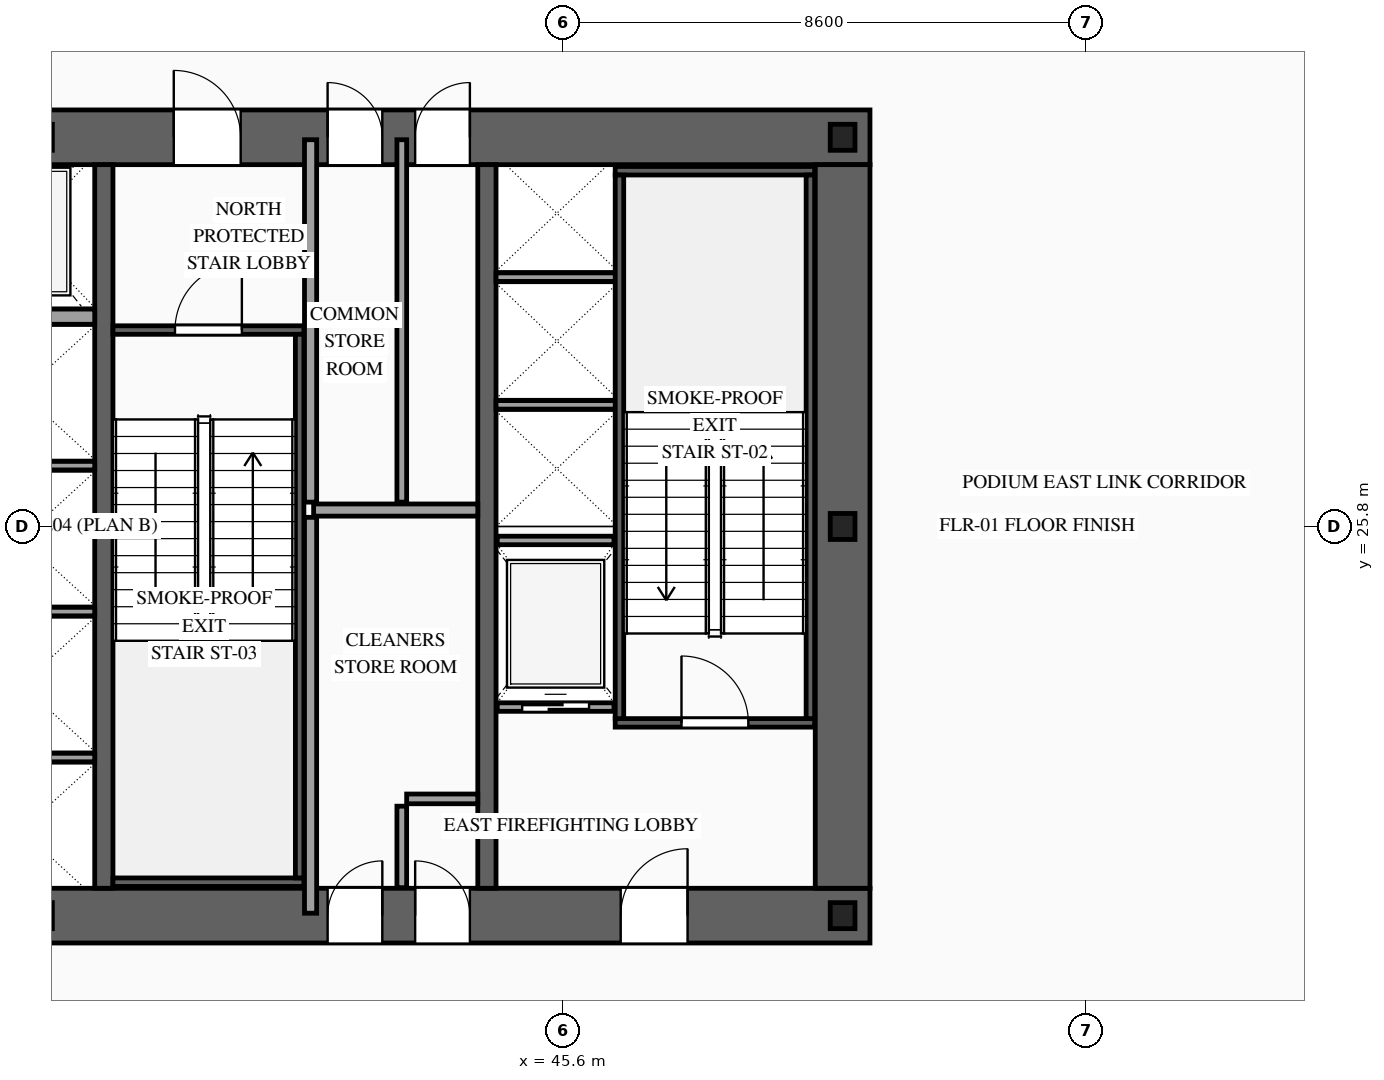
"""IFC4 building model, lengths in metres.
Left out: names, types, materials, properties, quantities, classifications, styles, units other than length and angle.
Written with IfcOpenShell. Run it as: python <this file> out.ifc"""

import sys

from ifc_helpers import new_model, si_unit, direction, frame, frame_2d, origin, origin_2d, place, context, subcontext, project, spatial, rectangle, i_section, extrude, source, transform, mapped, element, fill, save


model = new_model("IFC4")
c1 = context("Model", 3, precision=1e-05, world=origin(), true_north=direction((0.0, 1.0)))
c2 = subcontext(c1, "Body", "Model", "MODEL_VIEW")
j1 = project(units=[si_unit("LENGTHUNIT", "METRE"), si_unit("PLANEANGLEUNIT", "RADIAN")], contexts=[c1])
p1 = place(None, origin())
s1 = spatial("IfcSite", under=j1, at=p1, CompositionType="ELEMENT")
p2 = place(p1, origin())
s2 = spatial("IfcBuilding", under=s1, at=p2, CompositionType="ELEMENT")
p3 = place(p2, frame((0.0, 0.0, 25.8)))
s3 = spatial("IfcBuildingStorey", under=s2, at=p3, CompositionType="ELEMENT", Elevation=25.8)
p4 = place(p3, frame((23.35, 19.4, 0.0), z_axis=(0.0, 0.0, 1.0), x_axis=(1.0, 0.0, 0.0)))
e1 = element("IfcWall", 1, at=p4, inside=s3, PredefinedType="SHEAR", context=c2, shape_type="SweptSolid", body=[
    extrude(rectangle(XDim=27.3, YDim=0.9, at=frame_2d((13.65, 0.0))), origin(), (0.0, 0.0, 1.0), 4.8),
])
p5 = place(p4, frame((2.1, 0.0, 0.0)))
e2 = element("IfcOpeningElement", 2, at=p5, cuts=e1, PredefinedType="OPENING", context=c2, shape_type="SweptSolid", body=[
    extrude(rectangle(XDim=1.1, YDim=2.2, at=frame_2d((0.55, 1.1))), frame((0.0, 0.465, 0.0), z_axis=(0.0, -1.0, 0.0), x_axis=(1.0, 0.0, 0.0)), (0.0, 0.0, 1.0), 0.93),
])
p6 = place(p4, frame((10.0, 0.0, 0.0)))
e3 = element("IfcOpeningElement", 3, at=p6, cuts=e1, PredefinedType="OPENING", context=c2, shape_type="SweptSolid", body=[
    extrude(rectangle(XDim=1.1, YDim=2.2, at=frame_2d((0.55, 1.1))), frame((0.0, 0.465, 0.0), z_axis=(0.0, -1.0, 0.0), x_axis=(1.0, 0.0, 0.0)), (0.0, 0.0, 1.0), 0.93),
])
p7 = place(p4, frame((23.2, 0.0, 0.0)))
e4 = element("IfcOpeningElement", 4, at=p7, cuts=e1, PredefinedType="OPENING", context=c2, shape_type="SweptSolid", body=[
    extrude(rectangle(XDim=1.1, YDim=2.2, at=frame_2d((0.55, 1.1))), frame((0.0, 0.465, 0.0), z_axis=(0.0, -1.0, 0.0), x_axis=(1.0, 0.0, 0.0)), (0.0, 0.0, 1.0), 0.93),
])
p8 = place(p4, frame((19.82, 0.0, 0.0)))
e5 = element("IfcOpeningElement", 5, at=p8, cuts=e1, PredefinedType="OPENING", context=c2, shape_type="SweptSolid", body=[
    extrude(rectangle(XDim=0.9, YDim=2.15, at=frame_2d((0.45, 1.075))), frame((0.0, 0.465, 0.0), z_axis=(0.0, -1.0, 0.0), x_axis=(1.0, 0.0, 0.0)), (0.0, 0.0, 1.0), 0.93),
])
p9 = place(p4, frame((18.38, 0.0, 0.0)))
e6 = element("IfcOpeningElement", 6, at=p9, cuts=e1, PredefinedType="OPENING", context=c2, shape_type="SweptSolid", body=[
    extrude(rectangle(XDim=0.9, YDim=2.15, at=frame_2d((0.45, 1.075))), frame((0.0, 0.465, 0.0), z_axis=(0.0, -1.0, 0.0), x_axis=(1.0, 0.0, 0.0)), (0.0, 0.0, 1.0), 0.93),
])
p10 = place(p3, frame((23.35, 32.2, 0.0), z_axis=(0.0, 0.0, 1.0), x_axis=(1.0, 0.0, 0.0)))
e7 = element("IfcWall", 7, at=p10, inside=s3, PredefinedType="SHEAR", context=c2, shape_type="SweptSolid", body=[
    extrude(rectangle(XDim=27.3, YDim=0.9, at=frame_2d((13.65, 0.0))), origin(), (0.0, 0.0, 1.0), 4.8),
])
p11 = place(p10, frame((4.72, 0.0, 0.0)))
e8 = element("IfcOpeningElement", 8, at=p11, cuts=e7, PredefinedType="OPENING", context=c2, shape_type="SweptSolid", body=[
    extrude(rectangle(XDim=0.9, YDim=2.15, at=frame_2d((0.45, 1.075))), frame((0.0, 0.465, 0.0), z_axis=(0.0, -1.0, 0.0), x_axis=(1.0, 0.0, 0.0)), (0.0, 0.0, 1.0), 0.93),
])
p12 = place(p10, frame((10.0, 0.0, 0.0)))
e9 = element("IfcOpeningElement", 9, at=p12, cuts=e7, PredefinedType="OPENING", context=c2, shape_type="SweptSolid", body=[
    extrude(rectangle(XDim=1.1, YDim=2.2, at=frame_2d((0.55, 1.1))), frame((0.0, 0.465, 0.0), z_axis=(0.0, -1.0, 0.0), x_axis=(1.0, 0.0, 0.0)), (0.0, 0.0, 1.0), 0.93),
])
p13 = place(p10, frame((15.85, 0.0, 0.0)))
e10 = element("IfcOpeningElement", 10, at=p13, cuts=e7, PredefinedType="OPENING", context=c2, shape_type="SweptSolid", body=[
    extrude(rectangle(XDim=1.1, YDim=2.2, at=frame_2d((0.55, 1.1))), frame((0.0, 0.465, 0.0), z_axis=(0.0, -1.0, 0.0), x_axis=(1.0, 0.0, 0.0)), (0.0, 0.0, 1.0), 0.93),
])
p14 = place(p10, frame((18.38, 0.0, 0.0)))
e11 = element("IfcOpeningElement", 11, at=p14, cuts=e7, PredefinedType="OPENING", context=c2, shape_type="SweptSolid", body=[
    extrude(rectangle(XDim=0.9, YDim=2.15, at=frame_2d((0.45, 1.075))), frame((0.0, 0.465, 0.0), z_axis=(0.0, -1.0, 0.0), x_axis=(1.0, 0.0, 0.0)), (0.0, 0.0, 1.0), 0.93),
])
p15 = place(p10, frame((19.82, 0.0, 0.0)))
e12 = element("IfcOpeningElement", 12, at=p15, cuts=e7, PredefinedType="OPENING", context=c2, shape_type="SweptSolid", body=[
    extrude(rectangle(XDim=0.9, YDim=2.15, at=frame_2d((0.45, 1.075))), frame((0.0, 0.465, 0.0), z_axis=(0.0, -1.0, 0.0), x_axis=(1.0, 0.0, 0.0)), (0.0, 0.0, 1.0), 0.93),
])
m1 = source(origin(), c2, "Body", "SweptSolid", [
    extrude(rectangle(XDim=11.9, YDim=0.9, at=frame_2d((5.95, 0.0))), origin(), (0.0, 0.0, 1.0), 4.8),
])
p16 = place(p3, frame((50.2, 19.85, 0.0), z_axis=(0.0, 0.0, 1.0), x_axis=(0.0, 1.0, 0.0)))
e13 = element("IfcWall", 13, at=p16, inside=s3, PredefinedType="SHEAR", context=c2, shape_type="MappedRepresentation", body=[
    mapped(m1, transform((0.0, 0.0, 0.0), scale=1.0)),
])
m2 = source(origin(), c2, "Body", "SweptSolid", [
    extrude(rectangle(XDim=11.9, YDim=0.3, at=frame_2d((5.95, 0.0))), origin(), (0.0, 0.0, 1.0), 4.8),
])
for number, where, z_axis, x_axis in (
    (14, (38.05, 19.85, 0.0), (0.0, 0.0, 1.0), (0.0, 1.0, 0.0)),
    (15, (44.35, 19.85, 0.0), (0.0, 0.0, 1.0), (0.0, 1.0, 0.0)),
):
    element("IfcWall", number, at=place(p3, frame(where, z_axis=z_axis, x_axis=x_axis)), inside=s3, PredefinedType="SOLIDWALL", context=c2, shape_type="MappedRepresentation", body=[
        mapped(m2, transform((0.0, 0.0, 0.0), scale=1.0)),
    ])
m3 = source(origin(), c2, "Body", "SweptSolid", [
    extrude(i_section(OverallWidth=0.407, OverallDepth=0.428, WebThickness=0.02, FlangeThickness=0.035, at=origin_2d()), origin(), (0.0, 0.0, 1.0), 4.8),
])
for number, where, z_axis, x_axis in (
    (16, (37.0, 19.4, 0.0), (0.0, 0.0, 1.0), (1.0, 0.0, 0.0)),
    (17, (50.2, 19.4, 0.0), (0.0, 0.0, 1.0), (1.0, 0.0, 0.0)),
    (18, (50.2, 25.8, 0.0), (0.0, 0.0, 1.0), (1.0, 0.0, 0.0)),
    (19, (37.0, 32.2, 0.0), (0.0, 0.0, 1.0), (1.0, 0.0, 0.0)),
    (20, (50.2, 32.2, 0.0), (0.0, 0.0, 1.0), (1.0, 0.0, 0.0)),
):
    element("IfcColumn", number, at=place(p3, frame(where, z_axis=z_axis, x_axis=x_axis)), inside=s3, PredefinedType="COLUMN", context=c2, shape_type="MappedRepresentation", body=[
        mapped(m3, transform((0.0, 0.0, 0.0), scale=1.0)),
    ])
p17 = place(p3, frame((44.52, 22.83, 0.0), z_axis=(0.0, 0.0, 1.0), x_axis=(1.0, 0.0, 0.0)))
e21 = element("IfcWall", 21, at=p17, inside=s3, PredefinedType="SOLIDWALL", context=c2, shape_type="SweptSolid", body=[
    extrude(rectangle(XDim=1.92, YDim=0.14, at=frame_2d((0.96, 0.0))), origin(), (0.0, 0.0, 1.0), 4.5),
])
p18 = place(p17, frame((0.41, 0.0, 0.0)))
e22 = element("IfcOpeningElement", 22, at=p18, cuts=e21, PredefinedType="OPENING", context=c2, shape_type="SweptSolid", body=[
    extrude(rectangle(XDim=1.1, YDim=2.2, at=frame_2d((0.55, 1.1))), frame((0.0, 0.085, 0.0), z_axis=(0.0, -1.0, 0.0), x_axis=(1.0, 0.0, 0.0)), (0.0, 0.0, 1.0), 0.17),
])
m4 = source(origin(), c2, "Body", "SweptSolid", [
    extrude(rectangle(XDim=1.92, YDim=0.14, at=frame_2d((0.96, 0.0))), origin(), (0.0, 0.0, 1.0), 4.5),
])
p19 = place(p3, frame((44.52, 25.57, 0.0), z_axis=(0.0, 0.0, 1.0), x_axis=(1.0, 0.0, 0.0)))
e23 = element("IfcWall", 23, at=p19, inside=s3, PredefinedType="SOLIDWALL", context=c2, shape_type="MappedRepresentation", body=[
    mapped(m4, transform((0.0, 0.0, 0.0), scale=1.0)),
])
m5 = source(origin(), c2, "Body", "SweptSolid", [
    extrude(rectangle(XDim=2.4, YDim=0.14, at=frame_2d((1.2, 0.0))), origin(), (0.0, 0.0, 1.0), 4.5),
])
for number, where, z_axis, x_axis in (
    (24, (35.5, 22.0, 0.0), (0.0, 0.0, 1.0), (1.0, 0.0, 0.0)),
    (25, (35.5, 24.4, 0.0), (0.0, 0.0, 1.0), (1.0, 0.0, 0.0)),
    (26, (35.5, 26.8, 0.0), (0.0, 0.0, 1.0), (1.0, 0.0, 0.0)),
):
    element("IfcWall", number, at=place(p3, frame(where, z_axis=z_axis, x_axis=x_axis)), inside=s3, PredefinedType="SOLIDWALL", context=c2, shape_type="MappedRepresentation", body=[
        mapped(m5, transform((0.0, 0.0, 0.0), scale=1.0)),
    ])
m6 = source(origin(), c2, "Body", "SweptSolid", [
    extrude(rectangle(XDim=2.4, YDim=0.25, at=frame_2d((1.2, 0.0))), origin(), (0.0, 0.0, 1.0), 4.5),
])
p20 = place(p3, frame((35.5, 29.25, 0.0), z_axis=(0.0, 0.0, 1.0), x_axis=(1.0, 0.0, 0.0)))
e27 = element("IfcWall", 27, at=p20, inside=s3, PredefinedType="SOLIDWALL", context=c2, shape_type="MappedRepresentation", body=[
    mapped(m6, transform((0.0, 0.0, 0.0), scale=1.0)),
])
m7 = source(origin(), c2, "Body", "SweptSolid", [
    extrude(rectangle(XDim=2.0, YDim=0.14, at=frame_2d((1.0, 0.0))), origin(), (0.0, 0.0, 1.0), 4.5),
])
for number, where, z_axis, x_axis in (
    (28, (44.5, 27.8, 0.0), (0.0, 0.0, 1.0), (1.0, 0.0, 0.0)),
    (29, (44.5, 29.9, 0.0), (0.0, 0.0, 1.0), (1.0, 0.0, 0.0)),
):
    element("IfcWall", number, at=place(p3, frame(where, z_axis=z_axis, x_axis=x_axis)), inside=s3, PredefinedType="SOLIDWALL", context=c2, shape_type="MappedRepresentation", body=[
        mapped(m7, transform((0.0, 0.0, 0.0), scale=1.0)),
    ])
p21 = place(p3, frame((46.46, 22.57, 0.0), z_axis=(0.0, 0.0, 1.0), x_axis=(1.0, 0.0, 0.0)))
e30 = element("IfcWall", 30, at=p21, inside=s3, PredefinedType="SOLIDWALL", context=c2, shape_type="SweptSolid", body=[
    extrude(rectangle(XDim=3.28, YDim=0.14, at=frame_2d((1.64, 0.0))), origin(), (0.0, 0.0, 1.0), 4.5),
])
p22 = place(p21, frame((1.09, 0.0, 0.0)))
e31 = element("IfcOpeningElement", 31, at=p22, cuts=e30, PredefinedType="OPENING", context=c2, shape_type="SweptSolid", body=[
    extrude(rectangle(XDim=1.1, YDim=2.2, at=frame_2d((0.55, 1.1))), frame((0.0, 0.085, 0.0), z_axis=(0.0, -1.0, 0.0), x_axis=(1.0, 0.0, 0.0)), (0.0, 0.0, 1.0), 0.17),
])
m8 = source(origin(), c2, "Body", "SweptSolid", [
    extrude(rectangle(XDim=3.28, YDim=0.14, at=frame_2d((1.64, 0.0))), origin(), (0.0, 0.0, 1.0), 4.5),
])
p23 = place(p3, frame((46.46, 31.65, 0.0), z_axis=(0.0, 0.0, 1.0), x_axis=(1.0, 0.0, 0.0)))
e32 = element("IfcWall", 32, at=p23, inside=s3, PredefinedType="SOLIDWALL", context=c2, shape_type="MappedRepresentation", body=[
    mapped(m8, transform((0.0, 0.0, 0.0), scale=1.0)),
])
m9 = source(origin(), c2, "Body", "SweptSolid", [
    extrude(rectangle(XDim=8.94, YDim=0.14, at=frame_2d((4.47, 0.0))), origin(), (0.0, 0.0, 1.0), 4.5),
])
for number, where, z_axis, x_axis in (
    (33, (46.53, 22.64, 0.0), (0.0, 0.0, 1.0), (0.0, 1.0, 0.0)),
    (34, (49.67, 22.64, 0.0), (0.0, 0.0, 1.0), (0.0, 1.0, 0.0)),
):
    element("IfcWall", number, at=place(p3, frame(where, z_axis=z_axis, x_axis=x_axis)), inside=s3, PredefinedType="SOLIDWALL", context=c2, shape_type="MappedRepresentation", body=[
        mapped(m9, transform((0.0, 0.0, 0.0), scale=1.0)),
    ])
p24 = place(p3, frame((38.2, 29.03, 0.0), z_axis=(0.0, 0.0, 1.0), x_axis=(1.0, 0.0, 0.0)))
e35 = element("IfcWall", 35, at=p24, inside=s3, PredefinedType="SOLIDWALL", context=c2, shape_type="SweptSolid", body=[
    extrude(rectangle(XDim=3.14, YDim=0.14, at=frame_2d((1.57, 0.0))), origin(), (0.0, 0.0, 1.0), 4.5),
])
p25 = place(p24, frame((1.02, 0.0, 0.0)))
e36 = element("IfcOpeningElement", 36, at=p25, cuts=e35, PredefinedType="OPENING", context=c2, shape_type="SweptSolid", body=[
    extrude(rectangle(XDim=1.1, YDim=2.2, at=frame_2d((0.55, 1.1))), frame((0.0, 0.085, 0.0), z_axis=(0.0, -1.0, 0.0), x_axis=(1.0, 0.0, 0.0)), (0.0, 0.0, 1.0), 0.17),
])
m10 = source(origin(), c2, "Body", "SweptSolid", [
    extrude(rectangle(XDim=3.14, YDim=0.14, at=frame_2d((1.57, 0.0))), origin(), (0.0, 0.0, 1.0), 4.5),
])
p26 = place(p3, frame((38.2, 19.95, 0.0), z_axis=(0.0, 0.0, 1.0), x_axis=(1.0, 0.0, 0.0)))
e37 = element("IfcWall", 37, at=p26, inside=s3, PredefinedType="SOLIDWALL", context=c2, shape_type="MappedRepresentation", body=[
    mapped(m10, transform((0.0, 0.0, 0.0), scale=1.0)),
])
m11 = source(origin(), c2, "Body", "SweptSolid", [
    extrude(rectangle(XDim=8.94, YDim=0.14, at=frame_2d((4.47, 0.0))), origin(), (0.0, 0.0, 1.0), 4.5),
])
p27 = place(p3, frame((41.27, 20.02, 0.0), z_axis=(0.0, 0.0, 1.0), x_axis=(0.0, 1.0, 0.0)))
e38 = element("IfcWall", 38, at=p27, inside=s3, PredefinedType="SOLIDWALL", context=c2, shape_type="MappedRepresentation", body=[
    mapped(m11, transform((0.0, 0.0, 0.0), scale=1.0)),
])
m12 = source(origin(), c2, "Body", "SweptSolid", [
    extrude(rectangle(XDim=1.34, YDim=0.16, at=frame_2d((0.67, 0.0))), origin(), (0.0, 0.0, 1.0), 4.5),
])
p28 = place(p3, frame((42.95, 19.86, 0.0), z_axis=(0.0, 0.0, 1.0), x_axis=(0.0, 1.0, 0.0)))
e39 = element("IfcWall", 39, at=p28, inside=s3, PredefinedType="PARTITIONING", context=c2, shape_type="MappedRepresentation", body=[
    mapped(m12, transform((0.0, 0.0, 0.0), scale=1.0)),
])
m13 = source(origin(), c2, "Body", "SweptSolid", [
    extrude(rectangle(XDim=1.17, YDim=0.16, at=frame_2d((0.585, 0.0))), origin(), (0.0, 0.0, 1.0), 4.5),
])
p29 = place(p3, frame((43.03, 21.32, 0.0), z_axis=(0.0, 0.0, 1.0), x_axis=(1.0, 0.0, 0.0)))
e40 = element("IfcWall", 40, at=p29, inside=s3, PredefinedType="PARTITIONING", context=c2, shape_type="MappedRepresentation", body=[
    mapped(m13, transform((0.0, 0.0, 0.0), scale=1.0)),
])
m14 = source(origin(), c2, "Body", "SweptSolid", [
    extrude(rectangle(XDim=6.51, YDim=0.2, at=frame_2d((3.255, 0.0))), origin(), (0.0, 0.0, 1.0), 4.5),
])
p30 = place(p3, frame((41.45, 19.44, 0.0), z_axis=(0.0, 0.0, 1.0), x_axis=(0.0, 1.0, 0.0)))
e41 = element("IfcWall", 41, at=p30, inside=s3, PredefinedType="PARTITIONING", context=c2, shape_type="MappedRepresentation", body=[
    mapped(m14, transform((0.0, 0.0, 0.0), scale=1.0)),
])
m15 = source(origin(), c2, "Body", "SweptSolid", [
    extrude(rectangle(XDim=2.7, YDim=0.2, at=frame_2d((1.35, 0.0))), origin(), (0.0, 0.0, 1.0), 4.5),
])
p31 = place(p3, frame((41.5, 26.07, 0.0), z_axis=(0.0, 0.0, 1.0), x_axis=(1.0, 0.0, 0.0)))
e42 = element("IfcWall", 42, at=p31, inside=s3, PredefinedType="PARTITIONING", context=c2, shape_type="MappedRepresentation", body=[
    mapped(m15, transform((0.0, 0.0, 0.0), scale=1.0)),
])
m16 = source(origin(), c2, "Body", "SweptSolid", [
    extrude(rectangle(XDim=5.96, YDim=0.2, at=frame_2d((2.98, 0.0))), origin(), (0.0, 0.0, 1.0), 4.5),
])
p32 = place(p3, frame((41.45, 26.2, 0.0), z_axis=(0.0, 0.0, 1.0), x_axis=(0.0, 1.0, 0.0)))
e43 = element("IfcWall", 43, at=p32, inside=s3, PredefinedType="PARTITIONING", context=c2, shape_type="MappedRepresentation", body=[
    mapped(m16, transform((0.0, 0.0, 0.0), scale=1.0)),
])
m17 = source(origin(), c2, "Body", "SweptSolid", [
    extrude(rectangle(XDim=5.96, YDim=0.16, at=frame_2d((2.98, 0.0))), origin(), (0.0, 0.0, 1.0), 4.5),
])
p33 = place(p3, frame((42.95, 26.2, 0.0), z_axis=(0.0, 0.0, 1.0), x_axis=(0.0, 1.0, 0.0)))
e44 = element("IfcWall", 44, at=p33, inside=s3, PredefinedType="PARTITIONING", context=c2, shape_type="MappedRepresentation", body=[
    mapped(m17, transform((0.0, 0.0, 0.0), scale=1.0)),
])
m18 = source(origin(), c2, "Body", "SweptSolid", [
    extrude(rectangle(XDim=1.1, YDim=2.2, at=frame_2d((0.55, 1.1))), frame((0.0, 0.025, 0.0), z_axis=(0.0, -1.0, 0.0), x_axis=(1.0, 0.0, 0.0)), (0.0, 0.0, 1.0), 0.05),
])
p34 = place(p18, origin())
e45 = element("IfcDoor", 45, at=p34, inside=s3, OperationType="SLIDING_TO_RIGHT", PredefinedType="DOOR", context=c2, shape_type="MappedRepresentation", body=[
    mapped(m18, transform((0.0, 0.0, 0.0), scale=1.0)),
])
fill(e22, e45)
m19 = source(origin(), c2, "Body", "SweptSolid", [
    extrude(rectangle(XDim=1.1, YDim=2.2, at=frame_2d((0.55, 1.1))), frame((0.0, 0.025, 0.0), z_axis=(0.0, -1.0, 0.0), x_axis=(1.0, 0.0, 0.0)), (0.0, 0.0, 1.0), 0.05),
])
p35 = place(p22, origin())
e46 = element("IfcDoor", 46, at=p35, inside=s3, OperationType="SINGLE_SWING_LEFT", PredefinedType="DOOR", context=c2, shape_type="MappedRepresentation", body=[
    mapped(m19, transform((0.0, 0.0, 0.0), scale=1.0)),
])
fill(e31, e46)
p36 = place(p25, origin())
e47 = element("IfcDoor", 47, at=p36, inside=s3, OperationType="SINGLE_SWING_RIGHT", PredefinedType="DOOR", context=c2, shape_type="MappedRepresentation", body=[
    mapped(m19, transform((0.0, 0.0, 0.0), scale=1.0)),
])
fill(e36, e47)
p37 = place(p7, origin())
e48 = element("IfcDoor", 48, at=p37, inside=s3, OperationType="SINGLE_SWING_RIGHT", PredefinedType="DOOR", context=c2, shape_type="MappedRepresentation", body=[
    mapped(m19, transform((0.0, 0.0, 0.0), scale=1.0)),
])
fill(e4, e48)
p38 = place(p13, origin())
e49 = element("IfcDoor", 49, at=p38, inside=s3, OperationType="SINGLE_SWING_LEFT", PredefinedType="DOOR", context=c2, shape_type="MappedRepresentation", body=[
    mapped(m19, transform((0.0, 0.0, 0.0), scale=1.0)),
])
fill(e10, e49)
m20 = source(origin(), c2, "Body", "SweptSolid", [
    extrude(rectangle(XDim=0.9, YDim=2.15, at=frame_2d((0.45, 1.075))), frame((0.0, 0.025, 0.0), z_axis=(0.0, -1.0, 0.0), x_axis=(1.0, 0.0, 0.0)), (0.0, 0.0, 1.0), 0.05),
])
p39 = place(p8, origin())
e50 = element("IfcDoor", 50, at=p39, inside=s3, OperationType="SINGLE_SWING_LEFT", PredefinedType="DOOR", context=c2, shape_type="MappedRepresentation", body=[
    mapped(m20, transform((0.0, 0.0, 0.0), scale=1.0)),
])
fill(e5, e50)
p40 = place(p9, origin())
e51 = element("IfcDoor", 51, at=p40, inside=s3, OperationType="SINGLE_SWING_RIGHT", PredefinedType="DOOR", context=c2, shape_type="MappedRepresentation", body=[
    mapped(m20, transform((0.0, 0.0, 0.0), scale=1.0)),
])
fill(e6, e51)
p41 = place(p14, origin())
e52 = element("IfcDoor", 52, at=p41, inside=s3, OperationType="SINGLE_SWING_LEFT", PredefinedType="DOOR", context=c2, shape_type="MappedRepresentation", body=[
    mapped(m20, transform((0.0, 0.0, 0.0), scale=1.0)),
])
fill(e11, e52)
p42 = place(p15, origin())
e53 = element("IfcDoor", 53, at=p42, inside=s3, OperationType="SINGLE_SWING_RIGHT", PredefinedType="DOOR", context=c2, shape_type="MappedRepresentation", body=[
    mapped(m20, transform((0.0, 0.0, 0.0), scale=1.0)),
])
fill(e12, e53)
save(model, sys.argv[1])
